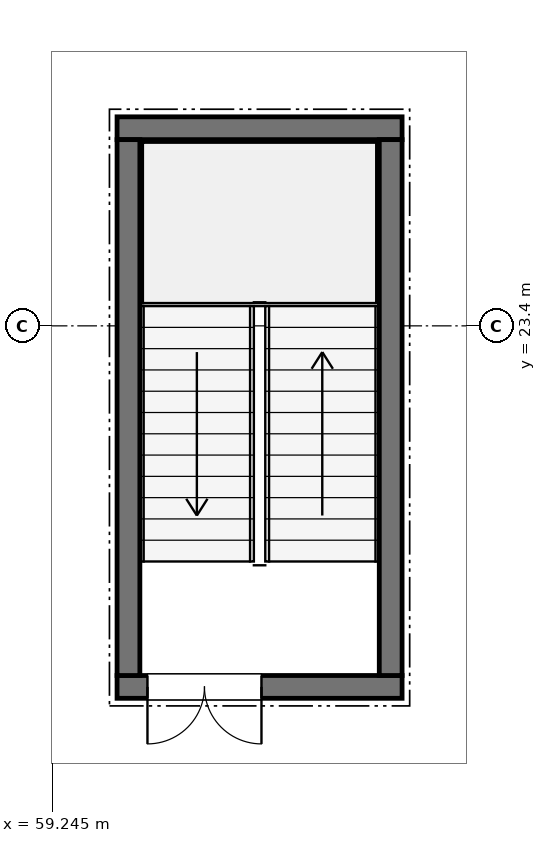
"""IFC4 building model, lengths in metres.
Left out: names, types, materials, properties, quantities, classifications, styles, units other than length and angle.
Written with IfcOpenShell. Run it as: python <this file> out.ifc"""

import sys

from ifc_helpers import new_model, si_unit, direction, frame, frame_2d, origin, place, context, subcontext, project, spatial, rectangle, extrude, element, fill, save


model = new_model("IFC4")
c1 = context("Model", 3, precision=1e-05, world=origin(), true_north=direction((0.0, 1.0)))
c2 = subcontext(c1, "Body", "Model", "MODEL_VIEW")
j1 = project(units=[si_unit("LENGTHUNIT", "METRE"), si_unit("PLANEANGLEUNIT", "RADIAN")], contexts=[c1])
p1 = place(None, origin())
s1 = spatial("IfcSite", under=j1, at=p1, CompositionType="ELEMENT")
p2 = place(p1, origin())
s2 = spatial("IfcBuilding", under=s1, at=p2, CompositionType="ELEMENT")
p3 = place(p2, frame((0.0, 0.0, -4.5)))
s3 = spatial("IfcBuildingStorey", under=s2, at=p3, CompositionType="ELEMENT", Elevation=-4.5)
p4 = place(p3, frame((60.1, 18.65, 0.0), z_axis=(0.0, 0.0, 1.0), x_axis=(1.0, 0.0, 0.0)))
e1 = element("IfcWall", 1, at=p4, inside=s3, PredefinedType="SHEAR", context=c2, shape_type="SweptSolid", body=[
    extrude(rectangle(XDim=3.75, YDim=0.3, at=frame_2d((1.875, 0.0))), origin(), (0.0, 0.0, 1.0), 4.28),
])
p5 = place(p4, frame((0.4, 0.0, 0.0)))
e2 = element("IfcOpeningElement", 2, at=p5, cuts=e1, PredefinedType="OPENING", context=c2, shape_type="SweptSolid", body=[
    extrude(rectangle(XDim=1.5, YDim=2.2, at=frame_2d((0.75, 1.1))), frame((0.0, 0.16, 0.0), z_axis=(0.0, -1.0, 0.0), x_axis=(1.0, 0.0, 0.0)), (0.0, 0.0, 1.0), 0.32),
])
p6 = place(p3, frame((60.1, 26.0, 0.0), z_axis=(0.0, 0.0, 1.0), x_axis=(1.0, 0.0, 0.0)))
e3 = element("IfcWall", 3, at=p6, inside=s3, PredefinedType="SHEAR", context=c2, shape_type="SweptSolid", body=[
    extrude(rectangle(XDim=3.75, YDim=0.3, at=frame_2d((1.875, 0.0))), origin(), (0.0, 0.0, 1.0), 4.28),
])
for number, where, z_axis, x_axis in (
    (4, (60.25, 18.8, 0.0), (0.0, 0.0, 1.0), (0.0, 1.0, 0.0)),
    (5, (63.7, 18.8, 0.0), (0.0, 0.0, 1.0), (0.0, 1.0, 0.0)),
):
    element("IfcWall", number, at=place(p3, frame(where, z_axis=z_axis, x_axis=x_axis)), inside=s3, PredefinedType="SHEAR", context=c2, shape_type="SweptSolid", body=[
        extrude(rectangle(XDim=7.05, YDim=0.3, at=frame_2d((3.525, 0.0))), origin(), (0.0, 0.0, 1.0), 4.28),
    ])
p7 = place(p5, frame((1.5, 0.0, 0.0), z_axis=(0.0, 0.0, 1.0), x_axis=(-1.0, 0.0, 0.0)))
e6 = element("IfcDoor", 6, at=p7, inside=s3, OperationType="DOUBLE_DOOR_SINGLE_SWING", PredefinedType="DOOR", context=c2, shape_type="SweptSolid", body=[
    extrude(rectangle(XDim=1.5, YDim=2.2, at=frame_2d((0.75, 1.1))), frame((0.0, 0.025, 0.0), z_axis=(0.0, -1.0, 0.0), x_axis=(1.0, 0.0, 0.0)), (0.0, 0.0, 1.0), 0.05),
])
fill(e2, e6)
save(model, sys.argv[1])
